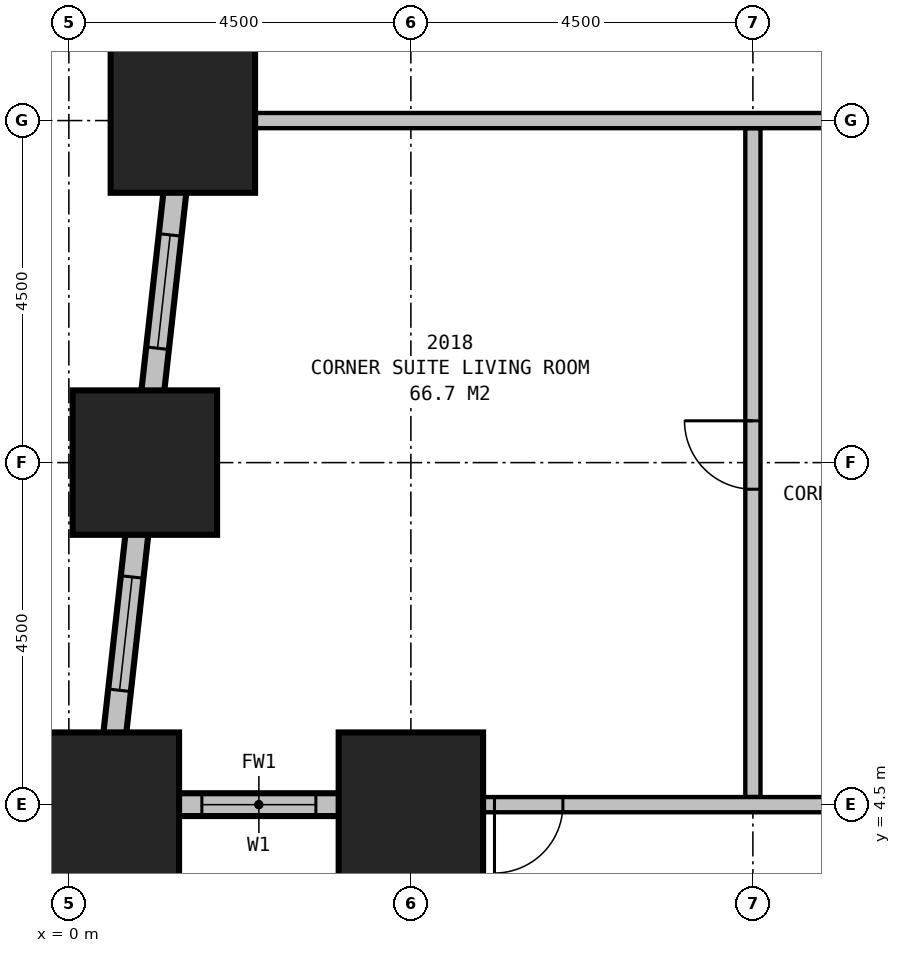
"""IFC4 building model, lengths in metres.
Left out: names, types, materials, properties, quantities, classifications, styles, units other than length and angle.
Written with IfcOpenShell. Run it as: python <this file> out.ifc"""

import sys

from ifc_helpers import new_model, si_unit, direction, frame, frame_2d, origin, origin_2d, place, context, subcontext, project, spatial, rectangle, extrude, element, fill, save


model = new_model("IFC4")
c1 = context("Model", 3, precision=1e-05, world=origin(), true_north=direction((0.0, 1.0)))
c2 = subcontext(c1, "Body", "Model", "MODEL_VIEW")
j1 = project(units=[si_unit("LENGTHUNIT", "METRE"), si_unit("PLANEANGLEUNIT", "RADIAN")], contexts=[c1])
p1 = place(None, origin())
s1 = spatial("IfcSite", under=j1, at=p1, CompositionType="ELEMENT")
p2 = place(p1, origin())
s2 = spatial("IfcBuilding", under=s1, at=p2, CompositionType="ELEMENT")
p3 = place(p2, frame((0.0, 0.0, 82.2)))
s3 = spatial("IfcBuildingStorey", under=s2, at=p3, CompositionType="ELEMENT", Elevation=82.2)
for number, where, z_axis, x_axis in (
    (1, (0.5, 4.5, 0.0), (0.0, 0.0, 1.0), (1.0, 0.0, 0.0)),
    (2, (4.5, 4.5, 0.0), (0.0, 0.0, 1.0), (1.0, 0.0, 0.0)),
    (3, (1.5, 13.5, 0.0), (0.0, 0.0, 1.0), (1.0, 0.0, 0.0)),
    (4, (1.0, 9.0, 0.0), (0.0, 0.0, 1.0), (1.0, 0.0, 0.0)),
):
    element("IfcColumn", number, at=place(p3, frame(where, z_axis=z_axis, x_axis=x_axis)), inside=s3, PredefinedType="COLUMN", context=c2, shape_type="SweptSolid", body=[
        extrude(rectangle(XDim=1.9, YDim=1.9, at=origin_2d()), origin(), (0.0, 0.0, 1.0), 3.5),
    ])
p4 = place(p3, frame((0.35, 4.5, 0.0), z_axis=(0.0, 0.0, 1.0), x_axis=(1.0, 0.0, 0.0)))
e5 = element("IfcWall", 5, at=p4, inside=s3, PredefinedType="STANDARD", context=c2, shape_type="SweptSolid", body=[
    extrude(rectangle(XDim=4.3, YDim=0.3, at=frame_2d((2.15, 0.0))), origin(), (0.0, 0.0, 1.0), 2.1),
])
p5 = place(p4, frame((1.4, 0.0, 0.5)))
e6 = element("IfcOpeningElement", 6, at=p5, cuts=e5, PredefinedType="OPENING", context=c2, shape_type="SweptSolid", body=[
    extrude(rectangle(XDim=1.5, YDim=1.4, at=frame_2d((0.75, 0.7))), frame((0.0, 0.16, 0.0), z_axis=(0.0, -1.0, 0.0), x_axis=(1.0, 0.0, 0.0)), (0.0, 0.0, 1.0), 0.32),
])
p6 = place(p3, frame((4.5, 4.65, 0.0), z_axis=(0.0, 0.0, 1.0), x_axis=(0.0, -1.0, 0.0)))
e7 = element("IfcWall", 7, at=p6, inside=s3, PredefinedType="STANDARD", context=c2, shape_type="SweptSolid", body=[
    extrude(rectangle(XDim=4.8, YDim=0.3, at=frame_2d((2.4, 0.0))), origin(), (0.0, 0.0, 1.0), 2.1),
])
p7 = place(p6, frame((1.65, 0.0, 0.5)))
e8 = element("IfcOpeningElement", 8, at=p7, cuts=e7, PredefinedType="OPENING", context=c2, shape_type="SweptSolid", body=[
    extrude(rectangle(XDim=1.5, YDim=1.4, at=frame_2d((0.75, 0.7))), frame((0.0, 0.16, 0.0), z_axis=(0.0, -1.0, 0.0), x_axis=(1.0, 0.0, 0.0)), (0.0, 0.0, 1.0), 0.32),
])
p8 = place(p3, frame((4.017, 36.149, 0.0), z_axis=(0.0, 0.0, 1.0), x_axis=(-0.110433201132, -0.993883548555, 0.0)))
e9 = element("IfcWall", 9, at=p8, inside=s3, PredefinedType="STANDARD", context=c2, shape_type="SweptSolid", body=[
    extrude(rectangle(XDim=31.994, YDim=0.3, at=frame_2d((15.997, 0.0))), origin(), (0.0, 0.0, 1.0), 2.1),
])
p9 = place(p8, frame((1.664, 0.0, 0.5)))
e10 = element("IfcOpeningElement", 10, at=p9, cuts=e9, PredefinedType="OPENING", context=c2, shape_type="SweptSolid", body=[
    extrude(rectangle(XDim=1.5, YDim=1.4, at=frame_2d((0.75, 0.7))), frame((0.0, 0.16, 0.0), z_axis=(0.0, -1.0, 0.0), x_axis=(1.0, 0.0, 0.0)), (0.0, 0.0, 1.0), 0.32),
])
p10 = place(p8, frame((6.192, 0.0, 0.5)))
e11 = element("IfcOpeningElement", 11, at=p10, cuts=e9, PredefinedType="OPENING", context=c2, shape_type="SweptSolid", body=[
    extrude(rectangle(XDim=1.5, YDim=1.4, at=frame_2d((0.75, 0.7))), frame((0.0, 0.16, 0.0), z_axis=(0.0, -1.0, 0.0), x_axis=(1.0, 0.0, 0.0)), (0.0, 0.0, 1.0), 0.32),
])
p11 = place(p8, frame((10.719, 0.0, 0.5)))
e12 = element("IfcOpeningElement", 12, at=p11, cuts=e9, PredefinedType="OPENING", context=c2, shape_type="SweptSolid", body=[
    extrude(rectangle(XDim=1.5, YDim=1.4, at=frame_2d((0.75, 0.7))), frame((0.0, 0.16, 0.0), z_axis=(0.0, -1.0, 0.0), x_axis=(1.0, 0.0, 0.0)), (0.0, 0.0, 1.0), 0.32),
])
p12 = place(p8, frame((15.247, 0.0, 0.5)))
e13 = element("IfcOpeningElement", 13, at=p12, cuts=e9, PredefinedType="OPENING", context=c2, shape_type="SweptSolid", body=[
    extrude(rectangle(XDim=1.5, YDim=1.4, at=frame_2d((0.75, 0.7))), frame((0.0, 0.16, 0.0), z_axis=(0.0, -1.0, 0.0), x_axis=(1.0, 0.0, 0.0)), (0.0, 0.0, 1.0), 0.32),
])
p13 = place(p8, frame((19.775, 0.0, 0.5)))
e14 = element("IfcOpeningElement", 14, at=p13, cuts=e9, PredefinedType="OPENING", context=c2, shape_type="SweptSolid", body=[
    extrude(rectangle(XDim=1.5, YDim=1.4, at=frame_2d((0.75, 0.7))), frame((0.0, 0.16, 0.0), z_axis=(0.0, -1.0, 0.0), x_axis=(1.0, 0.0, 0.0)), (0.0, 0.0, 1.0), 0.32),
])
p14 = place(p8, frame((24.302, 0.0, 0.5)))
e15 = element("IfcOpeningElement", 15, at=p14, cuts=e9, PredefinedType="OPENING", context=c2, shape_type="SweptSolid", body=[
    extrude(rectangle(XDim=1.5, YDim=1.4, at=frame_2d((0.75, 0.7))), frame((0.0, 0.16, 0.0), z_axis=(0.0, -1.0, 0.0), x_axis=(1.0, 0.0, 0.0)), (0.0, 0.0, 1.0), 0.32),
])
p15 = place(p8, frame((28.83, 0.0, 0.5)))
e16 = element("IfcOpeningElement", 16, at=p15, cuts=e9, PredefinedType="OPENING", context=c2, shape_type="SweptSolid", body=[
    extrude(rectangle(XDim=1.5, YDim=1.4, at=frame_2d((0.75, 0.7))), frame((0.0, 0.16, 0.0), z_axis=(0.0, -1.0, 0.0), x_axis=(1.0, 0.0, 0.0)), (0.0, 0.0, 1.0), 0.32),
])
p16 = place(p3, frame((11.2, 13.5, 0.0), z_axis=(0.0, 0.0, 1.0), x_axis=(-1.0, 0.0, 0.0)))
e17 = element("IfcWall", 17, at=p16, inside=s3, PredefinedType="PARTITIONING", context=c2, shape_type="SweptSolid", body=[
    extrude(rectangle(XDim=9.921, YDim=0.2, at=frame_2d((4.96, 0.0))), origin(), (0.0, 0.0, 1.0), 1.9),
])
p17 = place(p3, frame((13.6, 4.5, 0.0), z_axis=(0.0, 0.0, 1.0), x_axis=(-1.0, 0.0, 0.0)))
e18 = element("IfcWall", 18, at=p17, inside=s3, PredefinedType="PARTITIONING", context=c2, shape_type="SweptSolid", body=[
    extrude(rectangle(XDim=9.1, YDim=0.2, at=frame_2d((4.55, 0.0))), origin(), (0.0, 0.0, 1.0), 3.25),
])
p18 = place(p17, frame((7.1, 0.0, 0.0)))
e19 = element("IfcOpeningElement", 19, at=p18, cuts=e18, PredefinedType="OPENING", context=c2, shape_type="SweptSolid", body=[
    extrude(rectangle(XDim=0.9, YDim=2.1, at=frame_2d((0.45, 1.05))), frame((0.0, 0.11, 0.0), z_axis=(0.0, -1.0, 0.0), x_axis=(1.0, 0.0, 0.0)), (0.0, 0.0, 1.0), 0.22),
])
p19 = place(p3, frame((9.0, 4.6, 0.0), z_axis=(0.0, 0.0, 1.0), x_axis=(0.0, 1.0, 0.0)))
e20 = element("IfcWall", 20, at=p19, inside=s3, PredefinedType="PARTITIONING", context=c2, shape_type="SweptSolid", body=[
    extrude(rectangle(XDim=8.8, YDim=0.2, at=frame_2d((4.4, 0.0))), origin(), (0.0, 0.0, 1.0), 2.2),
])
p20 = place(p19, frame((4.05, 0.0, 0.0)))
e21 = element("IfcOpeningElement", 21, at=p20, cuts=e20, PredefinedType="OPENING", context=c2, shape_type="SweptSolid", body=[
    extrude(rectangle(XDim=0.9, YDim=2.1, at=frame_2d((0.45, 1.05))), frame((0.0, 0.11, 0.0), z_axis=(0.0, -1.0, 0.0), x_axis=(1.0, 0.0, 0.0)), (0.0, 0.0, 1.0), 0.22),
])
p21 = place(p5, origin())
e22 = element("IfcWindow", 22, at=p21, inside=s3, PartitioningType="SINGLE_PANEL", PredefinedType="WINDOW", context=c2, shape_type="SweptSolid", body=[
    extrude(rectangle(XDim=1.5, YDim=1.4, at=frame_2d((0.75, 0.7))), frame((0.0, 0.03, 0.0), z_axis=(0.0, -1.0, 0.0), x_axis=(1.0, 0.0, 0.0)), (0.0, 0.0, 1.0), 0.06),
])
fill(e6, e22)
p22 = place(p14, origin())
e23 = element("IfcWindow", 23, at=p22, inside=s3, PartitioningType="SINGLE_PANEL", PredefinedType="WINDOW", context=c2, shape_type="SweptSolid", body=[
    extrude(rectangle(XDim=1.5, YDim=1.4, at=frame_2d((0.75, 0.7))), frame((0.0, 0.03, 0.0), z_axis=(0.0, -1.0, 0.0), x_axis=(1.0, 0.0, 0.0)), (0.0, 0.0, 1.0), 0.06),
])
fill(e15, e23)
p23 = place(p15, origin())
e24 = element("IfcWindow", 24, at=p23, inside=s3, PartitioningType="SINGLE_PANEL", PredefinedType="WINDOW", context=c2, shape_type="SweptSolid", body=[
    extrude(rectangle(XDim=1.5, YDim=1.4, at=frame_2d((0.75, 0.7))), frame((0.0, 0.03, 0.0), z_axis=(0.0, -1.0, 0.0), x_axis=(1.0, 0.0, 0.0)), (0.0, 0.0, 1.0), 0.06),
])
fill(e16, e24)
p24 = place(p18, origin())
e25 = element("IfcDoor", 25, at=p24, inside=s3, OperationType="SINGLE_SWING_RIGHT", PredefinedType="DOOR", context=c2, shape_type="SweptSolid", body=[
    extrude(rectangle(XDim=0.9, YDim=2.1, at=frame_2d((0.45, 1.05))), frame((0.0, 0.025, 0.0), z_axis=(0.0, -1.0, 0.0), x_axis=(1.0, 0.0, 0.0)), (0.0, 0.0, 1.0), 0.05),
])
fill(e19, e25)
p25 = place(p20, origin())
e26 = element("IfcDoor", 26, at=p25, inside=s3, OperationType="SINGLE_SWING_RIGHT", PredefinedType="DOOR", context=c2, shape_type="SweptSolid", body=[
    extrude(rectangle(XDim=0.9, YDim=2.1, at=frame_2d((0.45, 1.05))), frame((0.0, 0.025, 0.0), z_axis=(0.0, -1.0, 0.0), x_axis=(1.0, 0.0, 0.0)), (0.0, 0.0, 1.0), 0.05),
])
fill(e21, e26)
save(model, sys.argv[1])
